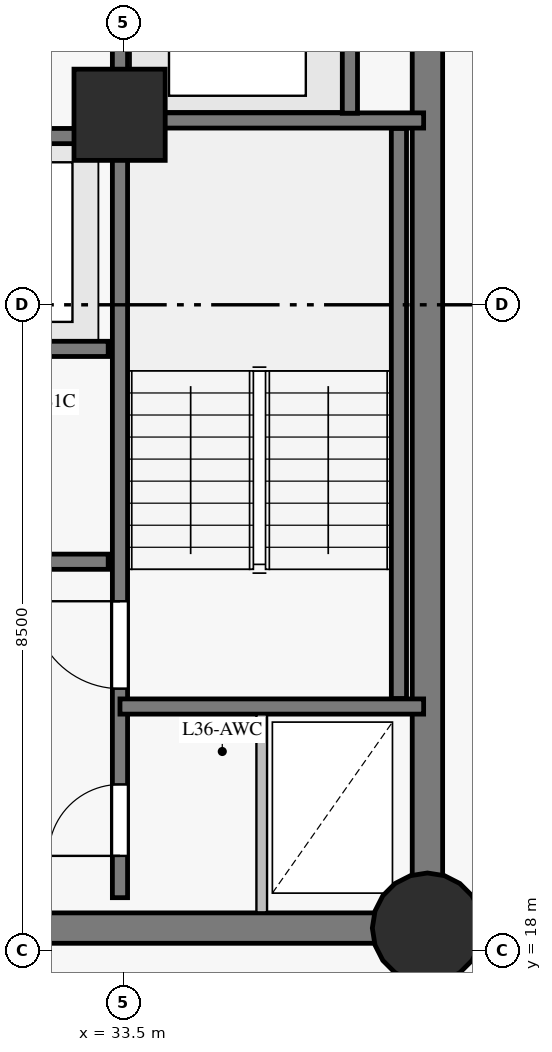
"""IFC4 building model, lengths in metres.
Left out: names, types, materials, properties, quantities, classifications, styles, units other than length and angle.
Written with IfcOpenShell. Run it as: python <this file> out.ifc"""

import sys

from ifc_helpers import new_model, si_unit, direction, frame, frame_2d, origin, origin_with_axes, origin_2d, place, context, subcontext, project, spatial, rectangle, circle, extrude, source, transform, mapped, element, fill, save


model = new_model("IFC4")
c1 = context("Model", 3, precision=1e-05, world=origin(), true_north=direction((0.0, 1.0)))
c2 = subcontext(c1, "Body", "Model", "MODEL_VIEW")
j1 = project(units=[si_unit("LENGTHUNIT", "METRE"), si_unit("PLANEANGLEUNIT", "RADIAN")], contexts=[c1])
p1 = place(None, origin())
s1 = spatial("IfcSite", under=j1, at=p1, CompositionType="ELEMENT")
p2 = place(p1, origin())
s2 = spatial("IfcBuilding", under=s1, at=p2, CompositionType="ELEMENT")
p3 = place(p2, frame((0.0, 0.0, 129.75)))
s3 = spatial("IfcBuildingStorey", under=s2, at=p3, CompositionType="ELEMENT", Elevation=129.75)
p4 = place(p3, frame((26.55, 18.3, 0.0), z_axis=(0.0, 0.0, 1.0), x_axis=(1.0, 0.0, 0.0)))
e1 = element("IfcWall", 1, at=p4, inside=s3, PredefinedType="SHEAR", context=c2, shape_type="SweptSolid", body=[
    extrude(rectangle(XDim=10.95, YDim=0.4, at=frame_2d((5.475, 0.0))), origin(), (0.0, 0.0, 1.0), 2.825),
])
p5 = place(p4, frame((4.55, 0.0, 0.0)))
e2 = element("IfcOpeningElement", 2, at=p5, cuts=e1, PredefinedType="OPENING", context=c2, shape_type="SweptSolid", body=[
    extrude(rectangle(XDim=1.4, YDim=2.2, at=frame_2d((0.7, 1.1))), frame((0.0, 0.21, 0.0), z_axis=(0.0, -1.0, 0.0), x_axis=(1.0, 0.0, 0.0)), (0.0, 0.0, 1.0), 0.42),
])
p6 = place(p3, frame((37.5, 18.3, 0.0), z_axis=(0.0, 0.0, 1.0), x_axis=(0.0, 1.0, 0.0)))
e3 = element("IfcWall", 3, at=p6, inside=s3, PredefinedType="SHEAR", context=c2, shape_type="SweptSolid", body=[
    extrude(rectangle(XDim=16.4, YDim=0.4, at=frame_2d((8.2, 0.0))), origin(), (0.0, 0.0, 1.0), 2.825),
])
p7 = place(p6, frame((14.15, 0.0, 0.0)))
e4 = element("IfcOpeningElement", 4, at=p7, cuts=e3, PredefinedType="OPENING", context=c2, shape_type="SweptSolid", body=[
    extrude(rectangle(XDim=1.2, YDim=2.15, at=frame_2d((0.6, 1.075))), frame((0.0, 0.21, 0.0), z_axis=(0.0, -1.0, 0.0), x_axis=(1.0, 0.0, 0.0)), (0.0, 0.0, 1.0), 0.42),
])
m1 = source(origin_with_axes(), c2, "Body", "SweptSolid", [
    extrude(circle(Radius=0.725, at=origin_2d()), origin(), (0.0, 0.0, 1.0), 3.05),
])
p8 = place(p3, frame((37.5, 18.3, 0.0), z_axis=(0.0, 0.0, 1.0), x_axis=(1.0, 0.0, 0.0)))
e5 = element("IfcColumn", 5, at=p8, inside=s3, PredefinedType="COLUMN", context=c2, shape_type="MappedRepresentation", body=[
    mapped(m1, transform((0.0, 0.0, 0.0), scale=1.0)),
])
m2 = source(origin_with_axes(), c2, "Body", "SweptSolid", [
    extrude(rectangle(XDim=1.2, YDim=1.2, at=origin_2d()), origin(), (0.0, 0.0, 1.0), 3.05),
])
p9 = place(p3, frame((33.45, 29.0, 0.0), z_axis=(0.0, 0.0, 1.0), x_axis=(1.0, 0.0, 0.0)))
e6 = element("IfcColumn", 6, at=p9, inside=s3, PredefinedType="COLUMN", context=c2, shape_type="MappedRepresentation", body=[
    mapped(m2, transform((0.0, 0.0, 0.0), scale=1.0)),
])
p10 = place(p3, frame((33.455, 18.7, 0.0), z_axis=(0.0, 0.0, 1.0), x_axis=(0.0, 1.0, 0.0)))
e7 = element("IfcWall", 7, at=p10, inside=s3, PredefinedType="SHEAR", context=c2, shape_type="SweptSolid", body=[
    extrude(rectangle(XDim=15.6, YDim=0.2, at=frame_2d((7.8, 0.0))), origin(), (0.0, 0.0, 1.0), 2.825),
])
p11 = place(p10, frame((2.75, 0.0, 0.0)))
e8 = element("IfcOpeningElement", 8, at=p11, cuts=e7, PredefinedType="OPENING", context=c2, shape_type="SweptSolid", body=[
    extrude(rectangle(XDim=1.15, YDim=2.15, at=frame_2d((0.575, 1.075))), frame((0.0, 0.11, 0.0), z_axis=(0.0, -1.0, 0.0), x_axis=(1.0, 0.0, 0.0)), (0.0, 0.0, 1.0), 0.22),
])
p12 = place(p10, frame((0.55, 0.0, 0.0)))
e9 = element("IfcOpeningElement", 9, at=p12, cuts=e7, PredefinedType="OPENING", context=c2, shape_type="SweptSolid", body=[
    extrude(rectangle(XDim=0.94, YDim=2.1, at=frame_2d((0.47, 1.05))), frame((0.0, 0.11, 0.0), z_axis=(0.0, -1.0, 0.0), x_axis=(1.0, 0.0, 0.0)), (0.0, 0.0, 1.0), 0.22),
])
p13 = place(p3, frame((23.7, 23.12, 0.0), z_axis=(0.0, 0.0, 1.0), x_axis=(1.0, 0.0, 0.0)))
e10 = element("IfcWall", 10, at=p13, inside=s3, PredefinedType="SHEAR", context=c2, shape_type="SweptSolid", body=[
    extrude(rectangle(XDim=9.6, YDim=0.2, at=frame_2d((4.8, 0.0))), origin(), (0.0, 0.0, 1.0), 2.825),
])
p14 = place(p13, frame((0.7, 0.0, 0.0)))
e11 = element("IfcOpeningElement", 11, at=p14, cuts=e10, PredefinedType="OPENING", context=c2, shape_type="SweptSolid", body=[
    extrude(rectangle(XDim=0.92, YDim=2.1, at=frame_2d((0.46, 1.05))), frame((0.0, 0.11, 0.0), z_axis=(0.0, -1.0, 0.0), x_axis=(1.0, 0.0, 0.0)), (0.0, 0.0, 1.0), 0.22),
])
p15 = place(p13, frame((4.2, 0.0, 0.0)))
e12 = element("IfcOpeningElement", 12, at=p15, cuts=e10, PredefinedType="OPENING", context=c2, shape_type="SweptSolid", body=[
    extrude(rectangle(XDim=0.92, YDim=2.1, at=frame_2d((0.46, 1.05))), frame((0.0, 0.11, 0.0), z_axis=(0.0, -1.0, 0.0), x_axis=(1.0, 0.0, 0.0)), (0.0, 0.0, 1.0), 0.22),
])
p16 = place(p13, frame((7.45, 0.0, 0.0)))
e13 = element("IfcOpeningElement", 13, at=p16, cuts=e10, PredefinedType="OPENING", context=c2, shape_type="SweptSolid", body=[
    extrude(rectangle(XDim=0.92, YDim=2.1, at=frame_2d((0.46, 1.05))), frame((0.0, 0.11, 0.0), z_axis=(0.0, -1.0, 0.0), x_axis=(1.0, 0.0, 0.0)), (0.0, 0.0, 1.0), 0.22),
])
p17 = place(p3, frame((23.7, 25.92, 0.0), z_axis=(0.0, 0.0, 1.0), x_axis=(1.0, 0.0, 0.0)))
e14 = element("IfcWall", 14, at=p17, inside=s3, PredefinedType="SHEAR", context=c2, shape_type="SweptSolid", body=[
    extrude(rectangle(XDim=9.6, YDim=0.2, at=frame_2d((4.8, 0.0))), origin(), (0.0, 0.0, 1.0), 2.825),
])
p18 = place(p3, frame((23.7, 28.72, 0.0), z_axis=(0.0, 0.0, 1.0), x_axis=(1.0, 0.0, 0.0)))
e15 = element("IfcWall", 15, at=p18, inside=s3, PredefinedType="SHEAR", context=c2, shape_type="SweptSolid", body=[
    extrude(rectangle(XDim=9.6, YDim=0.2, at=frame_2d((4.8, 0.0))), origin(), (0.0, 0.0, 1.0), 2.825),
])
p19 = place(p18, frame((0.6, 0.0, 0.0)))
e16 = element("IfcOpeningElement", 16, at=p19, cuts=e15, PredefinedType="OPENING", context=c2, shape_type="SweptSolid", body=[
    extrude(rectangle(XDim=1.1, YDim=2.15, at=frame_2d((0.55, 1.075))), frame((0.0, 0.11, 0.0), z_axis=(0.0, -1.0, 0.0), x_axis=(1.0, 0.0, 0.0)), (0.0, 0.0, 1.0), 0.22),
])
p20 = place(p18, frame((2.98, 0.0, 0.0)))
e17 = element("IfcOpeningElement", 17, at=p20, cuts=e15, PredefinedType="OPENING", context=c2, shape_type="SweptSolid", body=[
    extrude(rectangle(XDim=1.1, YDim=2.15, at=frame_2d((0.55, 1.075))), frame((0.0, 0.11, 0.0), z_axis=(0.0, -1.0, 0.0), x_axis=(1.0, 0.0, 0.0)), (0.0, 0.0, 1.0), 0.22),
])
p21 = place(p18, frame((5.36, 0.0, 0.0)))
e18 = element("IfcOpeningElement", 18, at=p21, cuts=e15, PredefinedType="OPENING", context=c2, shape_type="SweptSolid", body=[
    extrude(rectangle(XDim=1.1, YDim=2.15, at=frame_2d((0.55, 1.075))), frame((0.0, 0.11, 0.0), z_axis=(0.0, -1.0, 0.0), x_axis=(1.0, 0.0, 0.0)), (0.0, 0.0, 1.0), 0.22),
])
p22 = place(p18, frame((7.74, 0.0, 0.0)))
e19 = element("IfcOpeningElement", 19, at=p22, cuts=e15, PredefinedType="OPENING", context=c2, shape_type="SweptSolid", body=[
    extrude(rectangle(XDim=1.1, YDim=2.15, at=frame_2d((0.55, 1.075))), frame((0.0, 0.11, 0.0), z_axis=(0.0, -1.0, 0.0), x_axis=(1.0, 0.0, 0.0)), (0.0, 0.0, 1.0), 0.22),
])
p23 = place(p3, frame((37.125, 21.32, 0.0), z_axis=(0.0, 0.0, 1.0), x_axis=(0.0, 1.0, 0.0)))
e20 = element("IfcWall", 20, at=p23, inside=s3, PredefinedType="SHEAR", context=c2, shape_type="SweptSolid", body=[
    extrude(rectangle(XDim=7.5, YDim=0.2, at=frame_2d((3.75, 0.0))), origin(), (0.0, 0.0, 1.0), 2.825),
])
for number, where, z_axis, x_axis in (
    (21, (33.455, 21.215, 0.0), (0.0, 0.0, 1.0), (1.0, 0.0, 0.0)),
    (22, (33.455, 28.925, 0.0), (0.0, 0.0, 1.0), (1.0, 0.0, 0.0)),
):
    element("IfcWall", number, at=place(p3, frame(where, z_axis=z_axis, x_axis=x_axis)), inside=s3, PredefinedType="SHEAR", context=c2, shape_type="SweptSolid", body=[
        extrude(rectangle(XDim=3.995, YDim=0.2, at=frame_2d((1.998, 0.0))), origin(), (0.0, 0.0, 1.0), 2.825),
    ])
p24 = place(p3, frame((36.48, 29.02, 0.0), z_axis=(0.0, 0.0, 1.0), x_axis=(0.0, 1.0, 0.0)))
e23 = element("IfcWall", 23, at=p24, inside=s3, PredefinedType="SHEAR", context=c2, shape_type="SweptSolid", body=[
    extrude(rectangle(XDim=2.86, YDim=0.2, at=frame_2d((1.43, 0.0))), origin(), (0.0, 0.0, 1.0), 2.825),
])
p25 = place(p3, frame((35.32, 18.507, 0.0), z_axis=(0.0, 0.0, 1.0), x_axis=(0.0, 1.0, 0.0)))
e24 = element("IfcWall", 24, at=p25, inside=s3, PredefinedType="PARTITIONING", context=c2, shape_type="SweptSolid", body=[
    extrude(rectangle(XDim=2.604, YDim=0.14, at=frame_2d((1.302, 0.0))), origin(), (0.0, 0.0, 1.0), 2.825),
])
m3 = source(origin_with_axes(), c2, "Body", "SweptSolid", [
    extrude(rectangle(XDim=1.15, YDim=2.15, at=frame_2d((0.575, 1.075))), frame((0.0, 0.025, 0.0), z_axis=(0.0, -1.0, 0.0), x_axis=(1.0, 0.0, 0.0)), (0.0, 0.0, 1.0), 0.05),
])
p26 = place(p11, origin())
e25 = element("IfcDoor", 25, at=p26, inside=s3, OperationType="SINGLE_SWING_RIGHT", PredefinedType="DOOR", context=c2, shape_type="MappedRepresentation", body=[
    mapped(m3, transform((0.0, 0.0, 0.0), scale=1.0)),
])
fill(e8, e25)
m4 = source(origin_with_axes(), c2, "Body", "SweptSolid", [
    extrude(rectangle(XDim=0.94, YDim=2.1, at=frame_2d((0.47, 1.05))), frame((0.0, 0.025, 0.0), z_axis=(0.0, -1.0, 0.0), x_axis=(1.0, 0.0, 0.0)), (0.0, 0.0, 1.0), 0.05),
])
p27 = place(p12, origin())
e26 = element("IfcDoor", 26, at=p27, inside=s3, OperationType="SINGLE_SWING_LEFT", PredefinedType="DOOR", context=c2, shape_type="MappedRepresentation", body=[
    mapped(m4, transform((0.0, 0.0, 0.0), scale=1.0)),
])
fill(e9, e26)
save(model, sys.argv[1])
